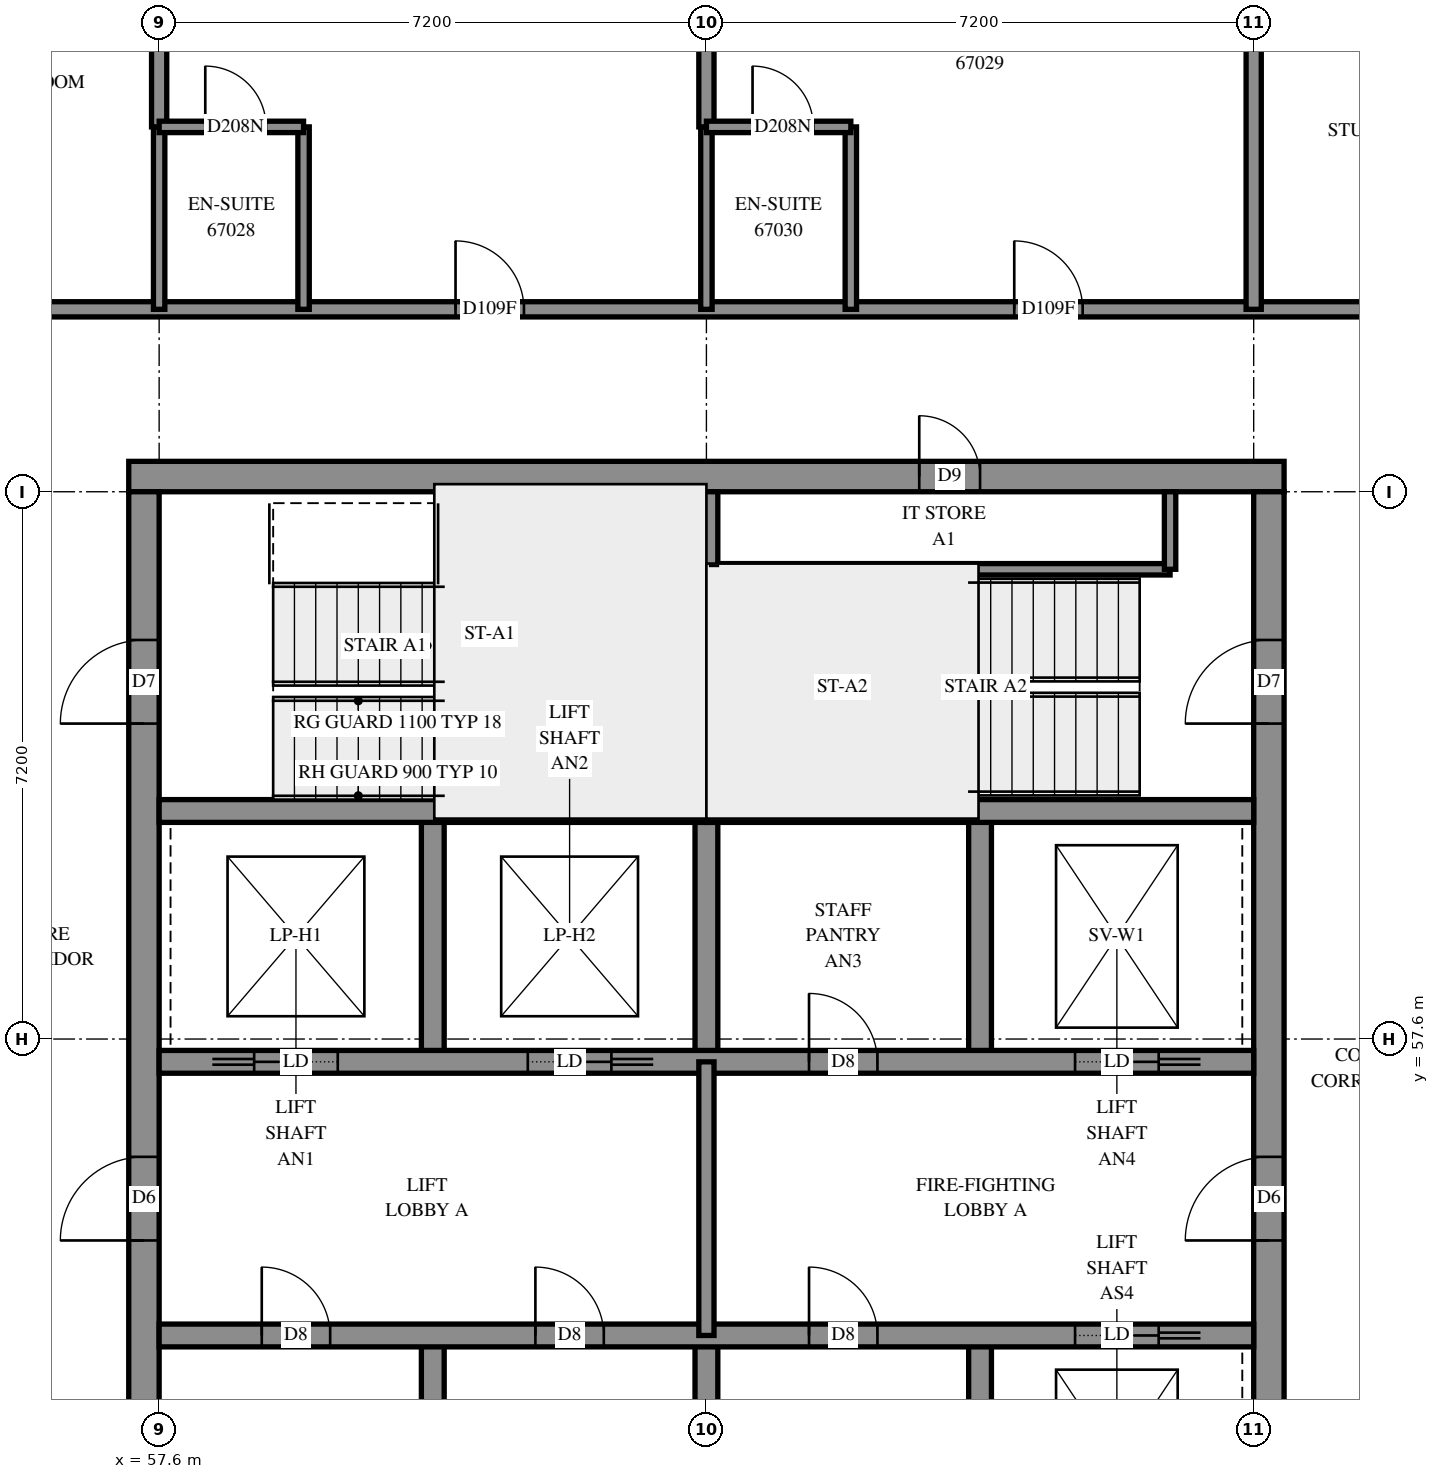
"""IFC4 building model, lengths in metres.
Left out: names, types, materials, properties, quantities, classifications, styles, units other than length and angle.
Written with IfcOpenShell. Run it as: python <this file> out.ifc"""

import sys

from ifc_helpers import new_model, si_unit, direction, frame, frame_2d, origin, place, context, subcontext, project, spatial, rectangle, extrude, element, fill, save


model = new_model("IFC4")
c1 = context("Model", 3, precision=1e-05, world=origin(), true_north=direction((0.0, 1.0)))
c2 = subcontext(c1, "Body", "Model", "MODEL_VIEW")
j1 = project(units=[si_unit("LENGTHUNIT", "METRE"), si_unit("PLANEANGLEUNIT", "RADIAN")], contexts=[c1])
p1 = place(None, origin())
s1 = spatial("IfcSite", under=j1, at=p1, CompositionType="ELEMENT")
p2 = place(p1, origin())
s2 = spatial("IfcBuilding", under=s1, at=p2, CompositionType="ELEMENT")
p3 = place(p2, frame((0.0, 0.0, 247.2)))
s3 = spatial("IfcBuildingStorey", under=s2, at=p3, CompositionType="ELEMENT", Elevation=247.2)
p4 = place(p3, frame((57.2, 65.0, -0.3), z_axis=(0.0, 0.0, 1.0), x_axis=(1.0, 0.0, 0.0)))
e1 = element("IfcWall", 1, at=p4, inside=s3, PredefinedType="SHEAR", context=c2, shape_type="SweptSolid", body=[
    extrude(rectangle(XDim=15.2, YDim=0.4, at=frame_2d((7.6, 0.0))), origin(), (0.0, 0.0, 1.0), 2.7),
])
p5 = place(p4, frame((10.4, 0.0, 0.3)))
e2 = element("IfcOpeningElement", 2, at=p5, cuts=e1, PredefinedType="OPENING", context=c2, shape_type="SweptSolid", body=[
    extrude(rectangle(XDim=0.8, YDim=2.1, at=frame_2d((0.4, 1.05))), frame((0.0, 0.21, 0.0), z_axis=(0.0, -1.0, 0.0), x_axis=(1.0, 0.0, 0.0)), (0.0, 0.0, 1.0), 0.42),
])
p6 = place(p3, frame((57.4, 50.4, -0.3), z_axis=(0.0, 0.0, 1.0), x_axis=(0.0, 1.0, 0.0)))
e3 = element("IfcWall", 3, at=p6, inside=s3, PredefinedType="SHEAR", context=c2, shape_type="SweptSolid", body=[
    extrude(rectangle(XDim=14.4, YDim=0.4, at=frame_2d((7.2, 0.0))), origin(), (0.0, 0.0, 1.0), 2.7),
])
p7 = place(p6, frame((4.55, 0.0, 0.3)))
e4 = element("IfcOpeningElement", 4, at=p7, cuts=e3, PredefinedType="OPENING", context=c2, shape_type="SweptSolid", body=[
    extrude(rectangle(XDim=1.1, YDim=2.1, at=frame_2d((0.55, 1.05))), frame((0.0, 0.21, 0.0), z_axis=(0.0, -1.0, 0.0), x_axis=(1.0, 0.0, 0.0)), (0.0, 0.0, 1.0), 0.42),
])
p8 = place(p6, frame((11.35, 0.0, 0.3)))
e5 = element("IfcOpeningElement", 5, at=p8, cuts=e3, PredefinedType="OPENING", context=c2, shape_type="SweptSolid", body=[
    extrude(rectangle(XDim=1.1, YDim=2.1, at=frame_2d((0.55, 1.05))), frame((0.0, 0.21, 0.0), z_axis=(0.0, -1.0, 0.0), x_axis=(1.0, 0.0, 0.0)), (0.0, 0.0, 1.0), 0.42),
])
p9 = place(p3, frame((72.2, 50.4, -0.3), z_axis=(0.0, 0.0, 1.0), x_axis=(0.0, 1.0, 0.0)))
e6 = element("IfcWall", 6, at=p9, inside=s3, PredefinedType="SHEAR", context=c2, shape_type="SweptSolid", body=[
    extrude(rectangle(XDim=14.4, YDim=0.4, at=frame_2d((7.2, 0.0))), origin(), (0.0, 0.0, 1.0), 2.7),
])
p10 = place(p9, frame((4.55, 0.0, 0.3)))
e7 = element("IfcOpeningElement", 7, at=p10, cuts=e6, PredefinedType="OPENING", context=c2, shape_type="SweptSolid", body=[
    extrude(rectangle(XDim=1.1, YDim=2.1, at=frame_2d((0.55, 1.05))), frame((0.0, 0.21, 0.0), z_axis=(0.0, -1.0, 0.0), x_axis=(1.0, 0.0, 0.0)), (0.0, 0.0, 1.0), 0.42),
])
p11 = place(p9, frame((11.35, 0.0, 0.3)))
e8 = element("IfcOpeningElement", 8, at=p11, cuts=e6, PredefinedType="OPENING", context=c2, shape_type="SweptSolid", body=[
    extrude(rectangle(XDim=1.1, YDim=2.1, at=frame_2d((0.55, 1.05))), frame((0.0, 0.21, 0.0), z_axis=(0.0, -1.0, 0.0), x_axis=(1.0, 0.0, 0.0)), (0.0, 0.0, 1.0), 0.42),
])
for number, where, z_axis, x_axis in (
    (9, (61.2, 50.4, 0.0), (0.0, 0.0, 1.0), (0.0, 1.0, 0.0)),
    (10, (61.2, 57.3, 0.0), (0.0, 0.0, 1.0), (0.0, 1.0, 0.0)),
    (11, (64.8, 50.4, 0.0), (0.0, 0.0, 1.0), (0.0, 1.0, 0.0)),
    (12, (64.8, 57.3, 0.0), (0.0, 0.0, 1.0), (0.0, 1.0, 0.0)),
    (13, (68.4, 50.4, 0.0), (0.0, 0.0, 1.0), (0.0, 1.0, 0.0)),
    (14, (68.4, 57.3, 0.0), (0.0, 0.0, 1.0), (0.0, 1.0, 0.0)),
):
    element("IfcWall", number, at=place(p3, frame(where, z_axis=z_axis, x_axis=x_axis)), inside=s3, PredefinedType="SOLIDWALL", context=c2, shape_type="SweptSolid", body=[
        extrude(rectangle(XDim=3.3, YDim=0.3, at=frame_2d((1.65, 0.0))), origin(), (0.0, 0.0, 1.0), 3.1),
    ])
p12 = place(p3, frame((57.6, 53.7, 0.0), z_axis=(0.0, 0.0, 1.0), x_axis=(1.0, 0.0, 0.0)))
e15 = element("IfcWall", 15, at=p12, inside=s3, PredefinedType="SOLIDWALL", context=c2, shape_type="SweptSolid", body=[
    extrude(rectangle(XDim=14.4, YDim=0.3, at=frame_2d((7.2, 0.0))), origin(), (0.0, 0.0, 1.0), 3.1),
])
p13 = place(p12, frame((1.35, 0.0, 0.0)))
e16 = element("IfcOpeningElement", 16, at=p13, cuts=e15, PredefinedType="OPENING", context=c2, shape_type="SweptSolid", body=[
    extrude(rectangle(XDim=0.9, YDim=2.1, at=frame_2d((0.45, 1.05))), frame((0.0, 0.16, 0.0), z_axis=(0.0, -1.0, 0.0), x_axis=(1.0, 0.0, 0.0)), (0.0, 0.0, 1.0), 0.32),
])
p14 = place(p12, frame((4.95, 0.0, 0.0)))
e17 = element("IfcOpeningElement", 17, at=p14, cuts=e15, PredefinedType="OPENING", context=c2, shape_type="SweptSolid", body=[
    extrude(rectangle(XDim=0.9, YDim=2.1, at=frame_2d((0.45, 1.05))), frame((0.0, 0.16, 0.0), z_axis=(0.0, -1.0, 0.0), x_axis=(1.0, 0.0, 0.0)), (0.0, 0.0, 1.0), 0.32),
])
p15 = place(p12, frame((8.55, 0.0, 0.0)))
e18 = element("IfcOpeningElement", 18, at=p15, cuts=e15, PredefinedType="OPENING", context=c2, shape_type="SweptSolid", body=[
    extrude(rectangle(XDim=0.9, YDim=2.1, at=frame_2d((0.45, 1.05))), frame((0.0, 0.16, 0.0), z_axis=(0.0, -1.0, 0.0), x_axis=(1.0, 0.0, 0.0)), (0.0, 0.0, 1.0), 0.32),
])
p16 = place(p12, frame((12.05, 0.0, 0.0)))
e19 = element("IfcOpeningElement", 19, at=p16, cuts=e15, PredefinedType="OPENING", context=c2, shape_type="SweptSolid", body=[
    extrude(rectangle(XDim=1.1, YDim=2.1, at=frame_2d((0.55, 1.05))), frame((0.0, 0.16, 0.0), z_axis=(0.0, -1.0, 0.0), x_axis=(1.0, 0.0, 0.0)), (0.0, 0.0, 1.0), 0.32),
])
p17 = place(p3, frame((57.6, 57.3, 0.0), z_axis=(0.0, 0.0, 1.0), x_axis=(1.0, 0.0, 0.0)))
e20 = element("IfcWall", 20, at=p17, inside=s3, PredefinedType="SOLIDWALL", context=c2, shape_type="SweptSolid", body=[
    extrude(rectangle(XDim=14.4, YDim=0.3, at=frame_2d((7.2, 0.0))), origin(), (0.0, 0.0, 1.0), 3.1),
])
p18 = place(p17, frame((8.55, 0.0, 0.0)))
e21 = element("IfcOpeningElement", 21, at=p18, cuts=e20, PredefinedType="OPENING", context=c2, shape_type="SweptSolid", body=[
    extrude(rectangle(XDim=0.9, YDim=2.1, at=frame_2d((0.45, 1.05))), frame((0.0, 0.16, 0.0), z_axis=(0.0, -1.0, 0.0), x_axis=(1.0, 0.0, 0.0)), (0.0, 0.0, 1.0), 0.32),
])
p19 = place(p17, frame((1.25, 0.0, 0.0)))
e22 = element("IfcOpeningElement", 22, at=p19, cuts=e20, PredefinedType="OPENING", context=c2, shape_type="SweptSolid", body=[
    extrude(rectangle(XDim=1.1, YDim=2.1, at=frame_2d((0.55, 1.05))), frame((0.0, 0.16, 0.0), z_axis=(0.0, -1.0, 0.0), x_axis=(1.0, 0.0, 0.0)), (0.0, 0.0, 1.0), 0.32),
])
p20 = place(p17, frame((4.85, 0.0, 0.0)))
e23 = element("IfcOpeningElement", 23, at=p20, cuts=e20, PredefinedType="OPENING", context=c2, shape_type="SweptSolid", body=[
    extrude(rectangle(XDim=1.1, YDim=2.1, at=frame_2d((0.55, 1.05))), frame((0.0, 0.16, 0.0), z_axis=(0.0, -1.0, 0.0), x_axis=(1.0, 0.0, 0.0)), (0.0, 0.0, 1.0), 0.32),
])
p21 = place(p17, frame((12.05, 0.0, 0.0)))
e24 = element("IfcOpeningElement", 24, at=p21, cuts=e20, PredefinedType="OPENING", context=c2, shape_type="SweptSolid", body=[
    extrude(rectangle(XDim=1.1, YDim=2.1, at=frame_2d((0.55, 1.05))), frame((0.0, 0.16, 0.0), z_axis=(0.0, -1.0, 0.0), x_axis=(1.0, 0.0, 0.0)), (0.0, 0.0, 1.0), 0.32),
])
for number, where, z_axis, x_axis in (
    (25, (57.6, 60.6, 0.0), (0.0, 0.0, 1.0), (1.0, 0.0, 0.0)),
    (26, (64.8, 60.6, 0.0), (0.0, 0.0, 1.0), (1.0, 0.0, 0.0)),
):
    element("IfcWall", number, at=place(p3, frame(where, z_axis=z_axis, x_axis=x_axis)), inside=s3, PredefinedType="SOLIDWALL", context=c2, shape_type="SweptSolid", body=[
        extrude(rectangle(XDim=7.2, YDim=0.3, at=frame_2d((3.6, 0.0))), origin(), (0.0, 0.0, 1.0), 3.1),
    ])
p22 = place(p3, frame((64.8, 60.6, 0.0), z_axis=(0.0, 0.0, 1.0), x_axis=(0.0, 1.0, 0.0)))
e27 = element("IfcWall", 27, at=p22, inside=s3, PredefinedType="SOLIDWALL", context=c2, shape_type="SweptSolid", body=[
    extrude(rectangle(XDim=4.2, YDim=0.3, at=frame_2d((2.1, 0.0))), origin(), (0.0, 0.0, 1.0), 3.1),
])
p23 = place(p3, frame((64.95, 63.78, 0.0), z_axis=(0.0, 0.0, 1.0), x_axis=(1.0, 0.0, 0.0)))
e28 = element("IfcWall", 28, at=p23, inside=s3, PredefinedType="PARTITIONING", context=c2, shape_type="SweptSolid", body=[
    extrude(rectangle(XDim=5.95, YDim=0.15, at=frame_2d((2.975, 0.0))), origin(), (0.0, 0.0, 1.0), 3.1),
])
p24 = place(p3, frame((70.9, 63.78, 0.0), z_axis=(0.0, 0.0, 1.0), x_axis=(0.0, 1.0, 0.0)))
e29 = element("IfcWall", 29, at=p24, inside=s3, PredefinedType="PARTITIONING", context=c2, shape_type="SweptSolid", body=[
    extrude(rectangle(XDim=1.02, YDim=0.15, at=frame_2d((0.51, 0.0))), origin(), (0.0, 0.0, 1.0), 3.1),
])
p25 = place(p3, frame((64.8, 53.7, 0.0), z_axis=(0.0, 0.0, 1.0), x_axis=(0.0, 1.0, 0.0)))
e30 = element("IfcWall", 30, at=p25, inside=s3, PredefinedType="PARTITIONING", context=c2, shape_type="SweptSolid", body=[
    extrude(rectangle(XDim=3.6, YDim=0.2, at=frame_2d((1.8, 0.0))), origin(), (0.0, 0.0, 1.0), 3.1),
])
p26 = place(p3, frame((55.2, 67.2, 0.0), z_axis=(0.0, 0.0, 1.0), x_axis=(1.0, 0.0, 0.0)))
e31 = element("IfcWall", 31, at=p26, inside=s3, PredefinedType="PARTITIONING", context=c2, shape_type="SweptSolid", body=[
    extrude(rectangle(XDim=19.2, YDim=0.2, at=frame_2d((9.6, 0.0))), origin(), (0.0, 0.0, 1.0), 3.1),
])
p27 = place(p26, frame((6.299, 0.0, 0.0)))
e32 = element("IfcOpeningElement", 32, at=p27, cuts=e31, PredefinedType="OPENING", context=c2, shape_type="SweptSolid", body=[
    extrude(rectangle(XDim=0.9, YDim=2.1, at=frame_2d((0.45, 1.05))), frame((0.0, 0.11, 0.0), z_axis=(0.0, -1.0, 0.0), x_axis=(1.0, 0.0, 0.0)), (0.0, 0.0, 1.0), 0.22),
])
p28 = place(p26, frame((13.65, 0.0, 0.0)))
e33 = element("IfcOpeningElement", 33, at=p28, cuts=e31, PredefinedType="OPENING", context=c2, shape_type="SweptSolid", body=[
    extrude(rectangle(XDim=0.9, YDim=2.1, at=frame_2d((0.45, 1.05))), frame((0.0, 0.11, 0.0), z_axis=(0.0, -1.0, 0.0), x_axis=(1.0, 0.0, 0.0)), (0.0, 0.0, 1.0), 0.22),
])
p29 = place(p3, frame((72.0, 67.2, 0.0), z_axis=(0.0, 0.0, 1.0), x_axis=(0.0, 1.0, 0.0)))
e34 = element("IfcWall", 34, at=p29, inside=s3, PredefinedType="PARTITIONING", context=c2, shape_type="SweptSolid", body=[
    extrude(rectangle(XDim=4.346, YDim=0.2, at=frame_2d((2.173, 0.0))), origin(), (0.0, 0.0, 1.0), 3.1),
])
for number, where, z_axis, x_axis in (
    (35, (59.5, 67.2, 0.0), (0.0, 0.0, 1.0), (0.0, 1.0, 0.0)),
    (36, (57.6, 67.2, 0.0), (0.0, 0.0, 1.0), (0.0, 1.0, 0.0)),
    (37, (66.7, 67.2, 0.0), (0.0, 0.0, 1.0), (0.0, 1.0, 0.0)),
    (38, (64.8, 67.2, 0.0), (0.0, 0.0, 1.0), (0.0, 1.0, 0.0)),
):
    element("IfcWall", number, at=place(p3, frame(where, z_axis=z_axis, x_axis=x_axis)), inside=s3, PredefinedType="PARTITIONING", context=c2, shape_type="SweptSolid", body=[
        extrude(rectangle(XDim=2.4, YDim=0.15, at=frame_2d((1.2, 0.0))), origin(), (0.0, 0.0, 1.0), 3.1),
    ])
for number, where, z_axis, x_axis in (
    (39, (57.6, 69.6, 0.0), (0.0, 0.0, 1.0), (0.0, 1.0, 0.0)),
    (40, (64.8, 69.6, 0.0), (0.0, 0.0, 1.0), (0.0, 1.0, 0.0)),
):
    element("IfcWall", number, at=place(p3, frame(where, z_axis=z_axis, x_axis=x_axis)), inside=s3, PredefinedType="PARTITIONING", context=c2, shape_type="SweptSolid", body=[
        extrude(rectangle(XDim=2.05, YDim=0.2, at=frame_2d((1.025, 0.0))), origin(), (0.0, 0.0, 1.0), 3.1),
    ])
p30 = place(p3, frame((64.8, 69.6, 0.0), z_axis=(0.0, 0.0, 1.0), x_axis=(1.0, 0.0, 0.0)))
e41 = element("IfcWall", 41, at=p30, inside=s3, PredefinedType="PARTITIONING", context=c2, shape_type="SweptSolid", body=[
    extrude(rectangle(XDim=1.9, YDim=0.15, at=frame_2d((0.95, 0.0))), origin(), (0.0, 0.0, 1.0), 3.1),
])
p31 = place(p30, frame((0.607, 0.0, 0.0)))
e42 = element("IfcOpeningElement", 42, at=p31, cuts=e41, PredefinedType="OPENING", context=c2, shape_type="SweptSolid", body=[
    extrude(rectangle(XDim=0.8, YDim=2.1, at=frame_2d((0.4, 1.05))), frame((0.0, 0.085, 0.0), z_axis=(0.0, -1.0, 0.0), x_axis=(1.0, 0.0, 0.0)), (0.0, 0.0, 1.0), 0.17),
])
p32 = place(p3, frame((57.6, 69.6, 0.0), z_axis=(0.0, 0.0, 1.0), x_axis=(1.0, 0.0, 0.0)))
e43 = element("IfcWall", 43, at=p32, inside=s3, PredefinedType="PARTITIONING", context=c2, shape_type="SweptSolid", body=[
    extrude(rectangle(XDim=1.9, YDim=0.15, at=frame_2d((0.95, 0.0))), origin(), (0.0, 0.0, 1.0), 3.1),
])
p33 = place(p32, frame((0.607, 0.0, 0.0)))
e44 = element("IfcOpeningElement", 44, at=p33, cuts=e43, PredefinedType="OPENING", context=c2, shape_type="SweptSolid", body=[
    extrude(rectangle(XDim=0.8, YDim=2.1, at=frame_2d((0.4, 1.05))), frame((0.0, 0.085, 0.0), z_axis=(0.0, -1.0, 0.0), x_axis=(1.0, 0.0, 0.0)), (0.0, 0.0, 1.0), 0.17),
])
p34 = place(p5, origin())
e45 = element("IfcDoor", 45, at=p34, inside=s3, OperationType="SINGLE_SWING_RIGHT", PredefinedType="DOOR", context=c2, shape_type="SweptSolid", body=[
    extrude(rectangle(XDim=0.8, YDim=2.1, at=frame_2d((0.4, 1.05))), frame((0.0, 0.025, 0.0), z_axis=(0.0, -1.0, 0.0), x_axis=(1.0, 0.0, 0.0)), (0.0, 0.0, 1.0), 0.05),
])
fill(e2, e45)
p35 = place(p7, origin())
e46 = element("IfcDoor", 46, at=p35, inside=s3, OperationType="DOUBLE_DOOR_SINGLE_SWING", PredefinedType="DOOR", context=c2, shape_type="SweptSolid", body=[
    extrude(rectangle(XDim=1.1, YDim=2.1, at=frame_2d((0.55, 1.05))), frame((0.0, 0.025, 0.0), z_axis=(0.0, -1.0, 0.0), x_axis=(1.0, 0.0, 0.0)), (0.0, 0.0, 1.0), 0.05),
])
fill(e4, e46)
p36 = place(p10, origin())
e47 = element("IfcDoor", 47, at=p36, inside=s3, OperationType="DOUBLE_DOOR_SINGLE_SWING", PredefinedType="DOOR", context=c2, shape_type="SweptSolid", body=[
    extrude(rectangle(XDim=1.1, YDim=2.1, at=frame_2d((0.55, 1.05))), frame((0.0, 0.025, 0.0), z_axis=(0.0, -1.0, 0.0), x_axis=(1.0, 0.0, 0.0)), (0.0, 0.0, 1.0), 0.05),
])
fill(e7, e47)
p37 = place(p8, origin())
e48 = element("IfcDoor", 48, at=p37, inside=s3, OperationType="SINGLE_SWING_LEFT", PredefinedType="DOOR", context=c2, shape_type="SweptSolid", body=[
    extrude(rectangle(XDim=1.1, YDim=2.1, at=frame_2d((0.55, 1.05))), frame((0.0, 0.025, 0.0), z_axis=(0.0, -1.0, 0.0), x_axis=(1.0, 0.0, 0.0)), (0.0, 0.0, 1.0), 0.05),
])
fill(e5, e48)
p38 = place(p11, origin())
e49 = element("IfcDoor", 49, at=p38, inside=s3, OperationType="SINGLE_SWING_RIGHT", PredefinedType="DOOR", context=c2, shape_type="SweptSolid", body=[
    extrude(rectangle(XDim=1.1, YDim=2.1, at=frame_2d((0.55, 1.05))), frame((0.0, 0.025, 0.0), z_axis=(0.0, -1.0, 0.0), x_axis=(1.0, 0.0, 0.0)), (0.0, 0.0, 1.0), 0.05),
])
fill(e8, e49)
p39 = place(p13, origin())
e50 = element("IfcDoor", 50, at=p39, inside=s3, OperationType="SINGLE_SWING_LEFT", PredefinedType="DOOR", context=c2, shape_type="SweptSolid", body=[
    extrude(rectangle(XDim=0.9, YDim=2.1, at=frame_2d((0.45, 1.05))), frame((0.0, 0.025, 0.0), z_axis=(0.0, -1.0, 0.0), x_axis=(1.0, 0.0, 0.0)), (0.0, 0.0, 1.0), 0.05),
])
fill(e16, e50)
p40 = place(p14, origin())
e51 = element("IfcDoor", 51, at=p40, inside=s3, OperationType="SINGLE_SWING_LEFT", PredefinedType="DOOR", context=c2, shape_type="SweptSolid", body=[
    extrude(rectangle(XDim=0.9, YDim=2.1, at=frame_2d((0.45, 1.05))), frame((0.0, 0.025, 0.0), z_axis=(0.0, -1.0, 0.0), x_axis=(1.0, 0.0, 0.0)), (0.0, 0.0, 1.0), 0.05),
])
fill(e17, e51)
p41 = place(p15, origin())
e52 = element("IfcDoor", 52, at=p41, inside=s3, OperationType="SINGLE_SWING_LEFT", PredefinedType="DOOR", context=c2, shape_type="SweptSolid", body=[
    extrude(rectangle(XDim=0.9, YDim=2.1, at=frame_2d((0.45, 1.05))), frame((0.0, 0.025, 0.0), z_axis=(0.0, -1.0, 0.0), x_axis=(1.0, 0.0, 0.0)), (0.0, 0.0, 1.0), 0.05),
])
fill(e18, e52)
p42 = place(p18, origin())
e53 = element("IfcDoor", 53, at=p42, inside=s3, OperationType="SINGLE_SWING_LEFT", PredefinedType="DOOR", context=c2, shape_type="SweptSolid", body=[
    extrude(rectangle(XDim=0.9, YDim=2.1, at=frame_2d((0.45, 1.05))), frame((0.0, 0.025, 0.0), z_axis=(0.0, -1.0, 0.0), x_axis=(1.0, 0.0, 0.0)), (0.0, 0.0, 1.0), 0.05),
])
fill(e21, e53)
p43 = place(p16, origin())
e54 = element("IfcDoor", 54, at=p43, inside=s3, OperationType="SLIDING_TO_RIGHT", PredefinedType="DOOR", context=c2, shape_type="SweptSolid", body=[
    extrude(rectangle(XDim=1.1, YDim=2.1, at=frame_2d((0.55, 1.05))), frame((0.0, 0.025, 0.0), z_axis=(0.0, -1.0, 0.0), x_axis=(1.0, 0.0, 0.0)), (0.0, 0.0, 1.0), 0.05),
])
fill(e19, e54)
p44 = place(p19, origin())
e55 = element("IfcDoor", 55, at=p44, inside=s3, OperationType="SLIDING_TO_LEFT", PredefinedType="DOOR", context=c2, shape_type="SweptSolid", body=[
    extrude(rectangle(XDim=1.1, YDim=2.1, at=frame_2d((0.55, 1.05))), frame((0.0, 0.025, 0.0), z_axis=(0.0, -1.0, 0.0), x_axis=(1.0, 0.0, 0.0)), (0.0, 0.0, 1.0), 0.05),
])
fill(e22, e55)
p45 = place(p20, origin())
e56 = element("IfcDoor", 56, at=p45, inside=s3, OperationType="SLIDING_TO_RIGHT", PredefinedType="DOOR", context=c2, shape_type="SweptSolid", body=[
    extrude(rectangle(XDim=1.1, YDim=2.1, at=frame_2d((0.55, 1.05))), frame((0.0, 0.025, 0.0), z_axis=(0.0, -1.0, 0.0), x_axis=(1.0, 0.0, 0.0)), (0.0, 0.0, 1.0), 0.05),
])
fill(e23, e56)
p46 = place(p21, origin())
e57 = element("IfcDoor", 57, at=p46, inside=s3, OperationType="SLIDING_TO_RIGHT", PredefinedType="DOOR", context=c2, shape_type="SweptSolid", body=[
    extrude(rectangle(XDim=1.1, YDim=2.1, at=frame_2d((0.55, 1.05))), frame((0.0, 0.025, 0.0), z_axis=(0.0, -1.0, 0.0), x_axis=(1.0, 0.0, 0.0)), (0.0, 0.0, 1.0), 0.05),
])
fill(e24, e57)
p47 = place(p27, origin())
e58 = element("IfcDoor", 58, at=p47, inside=s3, OperationType="SINGLE_SWING_RIGHT", PredefinedType="DOOR", context=c2, shape_type="SweptSolid", body=[
    extrude(rectangle(XDim=0.9, YDim=2.1, at=frame_2d((0.45, 1.05))), frame((0.0, 0.025, 0.0), z_axis=(0.0, -1.0, 0.0), x_axis=(1.0, 0.0, 0.0)), (0.0, 0.0, 1.0), 0.05),
])
fill(e32, e58)
p48 = place(p33, origin())
e59 = element("IfcDoor", 59, at=p48, inside=s3, OperationType="SINGLE_SWING_RIGHT", PredefinedType="DOOR", context=c2, shape_type="SweptSolid", body=[
    extrude(rectangle(XDim=0.8, YDim=2.1, at=frame_2d((0.4, 1.05))), frame((0.0, 0.025, 0.0), z_axis=(0.0, -1.0, 0.0), x_axis=(1.0, 0.0, 0.0)), (0.0, 0.0, 1.0), 0.05),
])
fill(e44, e59)
p49 = place(p28, origin())
e60 = element("IfcDoor", 60, at=p49, inside=s3, OperationType="SINGLE_SWING_RIGHT", PredefinedType="DOOR", context=c2, shape_type="SweptSolid", body=[
    extrude(rectangle(XDim=0.9, YDim=2.1, at=frame_2d((0.45, 1.05))), frame((0.0, 0.025, 0.0), z_axis=(0.0, -1.0, 0.0), x_axis=(1.0, 0.0, 0.0)), (0.0, 0.0, 1.0), 0.05),
])
fill(e33, e60)
p50 = place(p31, origin())
e61 = element("IfcDoor", 61, at=p50, inside=s3, OperationType="SINGLE_SWING_RIGHT", PredefinedType="DOOR", context=c2, shape_type="SweptSolid", body=[
    extrude(rectangle(XDim=0.8, YDim=2.1, at=frame_2d((0.4, 1.05))), frame((0.0, 0.025, 0.0), z_axis=(0.0, -1.0, 0.0), x_axis=(1.0, 0.0, 0.0)), (0.0, 0.0, 1.0), 0.05),
])
fill(e42, e61)
save(model, sys.argv[1])
